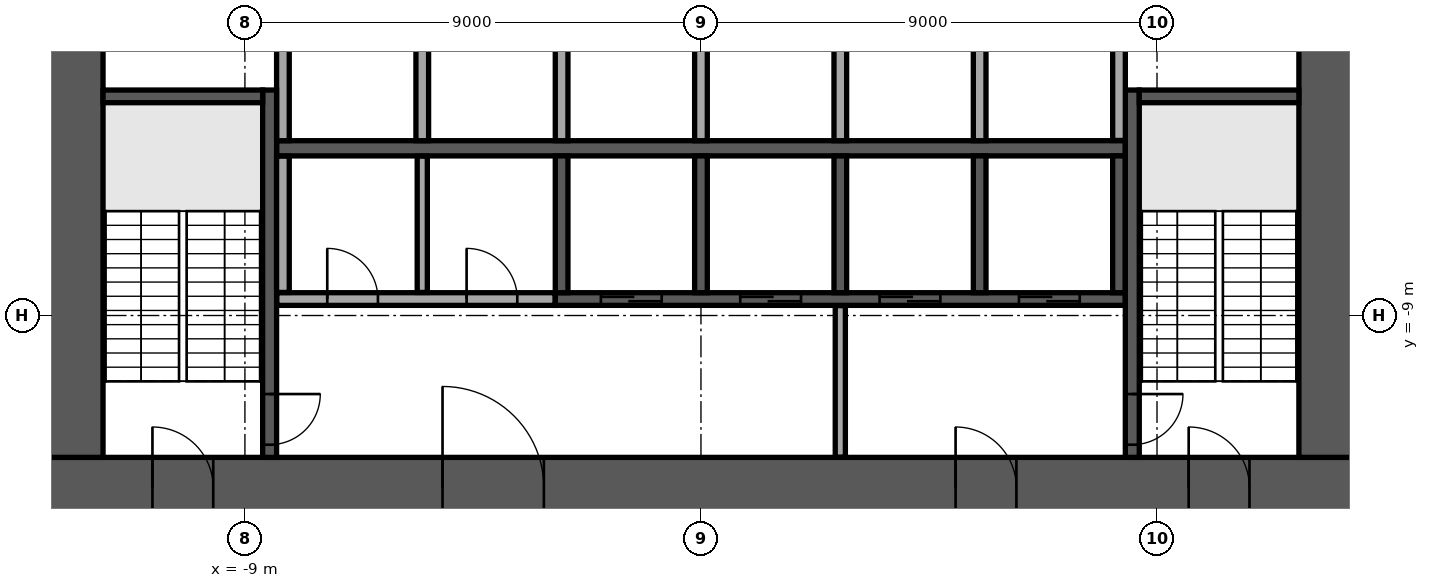
"""IFC4 building model, lengths in metres.
Left out: names, types, materials, properties, quantities, classifications, styles, units other than length and angle.
Written with IfcOpenShell. Run it as: python <this file> out.ifc"""

import sys

from ifc_helpers import new_model, si_unit, direction, frame, frame_2d, origin, place, context, subcontext, project, spatial, rectangle, extrude, element, fill, save


model = new_model("IFC4")
c1 = context("Model", 3, precision=1e-05, world=origin(), true_north=direction((0.0, 1.0)))
c2 = subcontext(c1, "Body", "Model", "MODEL_VIEW")
j1 = project(units=[si_unit("LENGTHUNIT", "METRE"), si_unit("PLANEANGLEUNIT", "RADIAN")], contexts=[c1])
p1 = place(None, origin())
s1 = spatial("IfcSite", under=j1, at=p1, CompositionType="ELEMENT")
p2 = place(p1, origin())
s2 = spatial("IfcBuilding", under=s1, at=p2, CompositionType="ELEMENT")
p3 = place(p2, frame((0.0, 0.0, 36.9)))
s3 = spatial("IfcBuildingStorey", under=s2, at=p3, CompositionType="ELEMENT", Elevation=36.9)
p4 = place(p3, frame((-13.0, -12.4, 0.0), z_axis=(0.0, 0.0, 1.0), x_axis=(1.0, 0.0, 0.0)))
e1 = element("IfcWall", 1, at=p4, inside=s3, PredefinedType="SHEAR", context=c2, shape_type="SweptSolid", body=[
    extrude(rectangle(XDim=26.0, YDim=1.2, at=frame_2d((13.0, 0.0))), origin(), (0.0, 0.0, 1.0), 4.35),
])
p5 = place(p4, frame((7.9, 0.0, 0.0)))
e2 = element("IfcOpeningElement", 2, at=p5, cuts=e1, PredefinedType="OPENING", context=c2, shape_type="SweptSolid", body=[
    extrude(rectangle(XDim=2.0, YDim=2.1, at=frame_2d((1.0, 1.05))), frame((0.0, 0.61, 0.0), z_axis=(0.0, -1.0, 0.0), x_axis=(1.0, 0.0, 0.0)), (0.0, 0.0, 1.0), 1.22),
])
p6 = place(p4, frame((18.025, 0.0, 0.0)))
e3 = element("IfcOpeningElement", 3, at=p6, cuts=e1, PredefinedType="OPENING", context=c2, shape_type="SweptSolid", body=[
    extrude(rectangle(XDim=1.2, YDim=2.1, at=frame_2d((0.6, 1.05))), frame((0.0, 0.61, 0.0), z_axis=(0.0, -1.0, 0.0), x_axis=(1.0, 0.0, 0.0)), (0.0, 0.0, 1.0), 1.22),
])
p7 = place(p4, frame((2.175, 0.0, 0.0)))
e4 = element("IfcOpeningElement", 4, at=p7, cuts=e1, PredefinedType="OPENING", context=c2, shape_type="SweptSolid", body=[
    extrude(rectangle(XDim=1.2, YDim=2.1, at=frame_2d((0.6, 1.05))), frame((0.0, 0.61, 0.0), z_axis=(0.0, -1.0, 0.0), x_axis=(1.0, 0.0, 0.0)), (0.0, 0.0, 1.0), 1.22),
])
p8 = place(p4, frame((22.625, 0.0, 0.0)))
e5 = element("IfcOpeningElement", 5, at=p8, cuts=e1, PredefinedType="OPENING", context=c2, shape_type="SweptSolid", body=[
    extrude(rectangle(XDim=1.2, YDim=2.1, at=frame_2d((0.6, 1.05))), frame((0.0, 0.61, 0.0), z_axis=(0.0, -1.0, 0.0), x_axis=(1.0, 0.0, 0.0)), (0.0, 0.0, 1.0), 1.22),
])
p9 = place(p3, frame((12.4, -11.8, 0.0), z_axis=(0.0, 0.0, 1.0), x_axis=(0.0, 1.0, 0.0)))
e6 = element("IfcWall", 6, at=p9, inside=s3, PredefinedType="SHEAR", context=c2, shape_type="SweptSolid", body=[
    extrude(rectangle(XDim=23.6, YDim=1.2, at=frame_2d((11.8, 0.0))), origin(), (0.0, 0.0, 1.0), 4.35),
])
p10 = place(p9, frame((10.6, 0.0, 0.0)))
e7 = element("IfcOpeningElement", 7, at=p10, cuts=e6, PredefinedType="OPENING", context=c2, shape_type="SweptSolid", body=[
    extrude(rectangle(XDim=2.4, YDim=2.4, at=frame_2d((1.2, 1.2))), frame((0.0, 0.61, 0.0), z_axis=(0.0, -1.0, 0.0), x_axis=(1.0, 0.0, 0.0)), (0.0, 0.0, 1.0), 1.22),
])
p11 = place(p3, frame((-12.4, -11.8, 0.0), z_axis=(0.0, 0.0, 1.0), x_axis=(0.0, 1.0, 0.0)))
e8 = element("IfcWall", 8, at=p11, inside=s3, PredefinedType="SHEAR", context=c2, shape_type="SweptSolid", body=[
    extrude(rectangle(XDim=23.6, YDim=1.2, at=frame_2d((11.8, 0.0))), origin(), (0.0, 0.0, 1.0), 4.35),
])
p12 = place(p11, frame((10.6, 0.0, 0.0)))
e9 = element("IfcOpeningElement", 9, at=p12, cuts=e8, PredefinedType="OPENING", context=c2, shape_type="SweptSolid", body=[
    extrude(rectangle(XDim=2.4, YDim=2.4, at=frame_2d((1.2, 1.2))), frame((0.0, 0.61, 0.0), z_axis=(0.0, -1.0, 0.0), x_axis=(1.0, 0.0, 0.0)), (0.0, 0.0, 1.0), 1.22),
])
p13 = place(p3, frame((-8.375, -5.7, 0.0), z_axis=(0.0, 0.0, 1.0), x_axis=(1.0, 0.0, 0.0)))
e10 = element("IfcWall", 10, at=p13, inside=s3, PredefinedType="SOLIDWALL", context=c2, shape_type="SweptSolid", body=[
    extrude(rectangle(XDim=16.75, YDim=0.3, at=frame_2d((8.375, 0.0))), origin(), (0.0, 0.0, 1.0), 4.35),
])
for number, where, z_axis, x_axis in (
    (11, (-8.25, -5.55, 0.0), (0.0, 0.0, 1.0), (0.0, 1.0, 0.0)),
    (12, (-5.5, -5.55, 0.0), (0.0, 0.0, 1.0), (0.0, 1.0, 0.0)),
    (13, (-2.75, -5.55, 0.0), (0.0, 0.0, 1.0), (0.0, 1.0, 0.0)),
    (14, (0.0, -5.55, 0.0), (0.0, 0.0, 1.0), (0.0, 1.0, 0.0)),
    (15, (2.75, -5.55, 0.0), (0.0, 0.0, 1.0), (0.0, 1.0, 0.0)),
    (16, (5.5, -5.55, 0.0), (0.0, 0.0, 1.0), (0.0, 1.0, 0.0)),
):
    element("IfcWall", number, at=place(p3, frame(where, z_axis=z_axis, x_axis=x_axis)), inside=s3, PredefinedType="SOLIDWALL", context=c2, shape_type="SweptSolid", body=[
        extrude(rectangle(XDim=2.7, YDim=0.25, at=frame_2d((1.35, 0.0))), origin(), (0.0, 0.0, 1.0), 4.35),
    ])
p14 = place(p3, frame((-2.875, -8.675, 0.0), z_axis=(0.0, 0.0, 1.0), x_axis=(1.0, 0.0, 0.0)))
e17 = element("IfcWall", 17, at=p14, inside=s3, PredefinedType="SOLIDWALL", context=c2, shape_type="SweptSolid", body=[
    extrude(rectangle(XDim=11.25, YDim=0.25, at=frame_2d((5.625, 0.0))), origin(), (0.0, 0.0, 1.0), 4.35),
])
p15 = place(p14, frame((0.9, 0.0, 0.0)))
e18 = element("IfcOpeningElement", 18, at=p15, cuts=e17, PredefinedType="OPENING", context=c2, shape_type="SweptSolid", body=[
    extrude(rectangle(XDim=1.2, YDim=2.1, at=frame_2d((0.6, 1.05))), frame((0.0, 0.135, 0.0), z_axis=(0.0, -1.0, 0.0), x_axis=(1.0, 0.0, 0.0)), (0.0, 0.0, 1.0), 0.27),
])
p16 = place(p14, frame((3.65, 0.0, 0.0)))
e19 = element("IfcOpeningElement", 19, at=p16, cuts=e17, PredefinedType="OPENING", context=c2, shape_type="SweptSolid", body=[
    extrude(rectangle(XDim=1.2, YDim=2.1, at=frame_2d((0.6, 1.05))), frame((0.0, 0.135, 0.0), z_axis=(0.0, -1.0, 0.0), x_axis=(1.0, 0.0, 0.0)), (0.0, 0.0, 1.0), 0.27),
])
p17 = place(p14, frame((6.4, 0.0, 0.0)))
e20 = element("IfcOpeningElement", 20, at=p17, cuts=e17, PredefinedType="OPENING", context=c2, shape_type="SweptSolid", body=[
    extrude(rectangle(XDim=1.2, YDim=2.1, at=frame_2d((0.6, 1.05))), frame((0.0, 0.135, 0.0), z_axis=(0.0, -1.0, 0.0), x_axis=(1.0, 0.0, 0.0)), (0.0, 0.0, 1.0), 0.27),
])
p18 = place(p14, frame((9.15, 0.0, 0.0)))
e21 = element("IfcOpeningElement", 21, at=p18, cuts=e17, PredefinedType="OPENING", context=c2, shape_type="SweptSolid", body=[
    extrude(rectangle(XDim=1.2, YDim=2.1, at=frame_2d((0.6, 1.05))), frame((0.0, 0.135, 0.0), z_axis=(0.0, -1.0, 0.0), x_axis=(1.0, 0.0, 0.0)), (0.0, 0.0, 1.0), 0.27),
])
for number, where, z_axis, x_axis in (
    (22, (-2.75, -8.55, 0.0), (0.0, 0.0, 1.0), (0.0, 1.0, 0.0)),
    (23, (0.0, -8.55, 0.0), (0.0, 0.0, 1.0), (0.0, 1.0, 0.0)),
    (24, (2.75, -8.55, 0.0), (0.0, 0.0, 1.0), (0.0, 1.0, 0.0)),
    (25, (5.5, -8.55, 0.0), (0.0, 0.0, 1.0), (0.0, 1.0, 0.0)),
    (26, (8.25, -8.55, 0.0), (0.0, 0.0, 1.0), (0.0, 1.0, 0.0)),
):
    element("IfcWall", number, at=place(p3, frame(where, z_axis=z_axis, x_axis=x_axis)), inside=s3, PredefinedType="SOLIDWALL", context=c2, shape_type="SweptSolid", body=[
        extrude(rectangle(XDim=2.7, YDim=0.25, at=frame_2d((1.35, 0.0))), origin(), (0.0, 0.0, 1.0), 4.35),
    ])
p19 = place(p3, frame((-8.512, -4.55, 0.0), z_axis=(0.0, 0.0, 1.0), x_axis=(0.0, -1.0, 0.0)))
e27 = element("IfcWall", 27, at=p19, inside=s3, PredefinedType="SOLIDWALL", context=c2, shape_type="SweptSolid", body=[
    extrude(rectangle(XDim=7.25, YDim=0.275, at=frame_2d((3.625, 0.0))), origin(), (0.0, 0.0, 1.0), 4.35),
])
p20 = place(p19, frame((6.0, 0.0, 0.0)))
e28 = element("IfcOpeningElement", 28, at=p20, cuts=e27, PredefinedType="OPENING", context=c2, shape_type="SweptSolid", body=[
    extrude(rectangle(XDim=1.0, YDim=2.1, at=frame_2d((0.5, 1.05))), frame((0.0, 0.147, 0.0), z_axis=(0.0, -1.0, 0.0), x_axis=(1.0, 0.0, 0.0)), (0.0, 0.0, 1.0), 0.295),
])
p21 = place(p3, frame((-8.65, -4.675, 0.0), z_axis=(0.0, 0.0, 1.0), x_axis=(-1.0, 0.0, 0.0)))
e29 = element("IfcWall", 29, at=p21, inside=s3, PredefinedType="SOLIDWALL", context=c2, shape_type="SweptSolid", body=[
    extrude(rectangle(XDim=3.15, YDim=0.25, at=frame_2d((1.575, 0.0))), origin(), (0.0, 0.0, 1.0), 4.35),
])
p22 = place(p3, frame((8.512, -4.55, 0.0), z_axis=(0.0, 0.0, 1.0), x_axis=(0.0, -1.0, 0.0)))
e30 = element("IfcWall", 30, at=p22, inside=s3, PredefinedType="SOLIDWALL", context=c2, shape_type="SweptSolid", body=[
    extrude(rectangle(XDim=7.25, YDim=0.275, at=frame_2d((3.625, 0.0))), origin(), (0.0, 0.0, 1.0), 4.35),
])
p23 = place(p22, frame((6.0, 0.0, 0.0)))
e31 = element("IfcOpeningElement", 31, at=p23, cuts=e30, PredefinedType="OPENING", context=c2, shape_type="SweptSolid", body=[
    extrude(rectangle(XDim=1.0, YDim=2.1, at=frame_2d((0.5, 1.05))), frame((0.0, 0.147, 0.0), z_axis=(0.0, -1.0, 0.0), x_axis=(1.0, 0.0, 0.0)), (0.0, 0.0, 1.0), 0.295),
])
p24 = place(p3, frame((8.65, -4.675, 0.0), z_axis=(0.0, 0.0, 1.0), x_axis=(1.0, 0.0, 0.0)))
e32 = element("IfcWall", 32, at=p24, inside=s3, PredefinedType="SOLIDWALL", context=c2, shape_type="SweptSolid", body=[
    extrude(rectangle(XDim=3.15, YDim=0.25, at=frame_2d((1.575, 0.0))), origin(), (0.0, 0.0, 1.0), 4.35),
])
p25 = place(p3, frame((2.75, -11.795, 0.0), z_axis=(0.0, 0.0, 1.0), x_axis=(0.0, 1.0, 0.0)))
e33 = element("IfcWall", 33, at=p25, inside=s3, PredefinedType="PARTITIONING", context=c2, shape_type="SweptSolid", body=[
    extrude(rectangle(XDim=2.99, YDim=0.2, at=frame_2d((1.495, 0.0))), origin(), (0.0, 0.0, 1.0), 4.35),
])
p26 = place(p3, frame((-8.37, -8.675, 0.0), z_axis=(0.0, 0.0, 1.0), x_axis=(1.0, 0.0, 0.0)))
e34 = element("IfcWall", 34, at=p26, inside=s3, PredefinedType="PARTITIONING", context=c2, shape_type="SweptSolid", body=[
    extrude(rectangle(XDim=5.49, YDim=0.25, at=frame_2d((2.745, 0.0))), origin(), (0.0, 0.0, 1.0), 4.35),
])
p27 = place(p26, frame((0.995, 0.0, 0.0)))
e35 = element("IfcOpeningElement", 35, at=p27, cuts=e34, PredefinedType="OPENING", context=c2, shape_type="SweptSolid", body=[
    extrude(rectangle(XDim=1.0, YDim=2.1, at=frame_2d((0.5, 1.05))), frame((0.0, 0.135, 0.0), z_axis=(0.0, -1.0, 0.0), x_axis=(1.0, 0.0, 0.0)), (0.0, 0.0, 1.0), 0.27),
])
p28 = place(p26, frame((3.745, 0.0, 0.0)))
e36 = element("IfcOpeningElement", 36, at=p28, cuts=e34, PredefinedType="OPENING", context=c2, shape_type="SweptSolid", body=[
    extrude(rectangle(XDim=1.0, YDim=2.1, at=frame_2d((0.5, 1.05))), frame((0.0, 0.135, 0.0), z_axis=(0.0, -1.0, 0.0), x_axis=(1.0, 0.0, 0.0)), (0.0, 0.0, 1.0), 0.27),
])
p29 = place(p3, frame((-8.25, -8.545, 0.0), z_axis=(0.0, 0.0, 1.0), x_axis=(0.0, 1.0, 0.0)))
e37 = element("IfcWall", 37, at=p29, inside=s3, PredefinedType="PARTITIONING", context=c2, shape_type="SweptSolid", body=[
    extrude(rectangle(XDim=2.69, YDim=0.25, at=frame_2d((1.345, 0.0))), origin(), (0.0, 0.0, 1.0), 4.35),
])
p30 = place(p3, frame((-5.5, -8.545, 0.0), z_axis=(0.0, 0.0, 1.0), x_axis=(0.0, 1.0, 0.0)))
e38 = element("IfcWall", 38, at=p30, inside=s3, PredefinedType="PARTITIONING", context=c2, shape_type="SweptSolid", body=[
    extrude(rectangle(XDim=2.69, YDim=0.2, at=frame_2d((1.345, 0.0))), origin(), (0.0, 0.0, 1.0), 4.35),
])
p31 = place(p3, frame((8.25, -5.545, 0.0), z_axis=(0.0, 0.0, 1.0), x_axis=(0.0, 1.0, 0.0)))
e39 = element("IfcWall", 39, at=p31, inside=s3, PredefinedType="PARTITIONING", context=c2, shape_type="SweptSolid", body=[
    extrude(rectangle(XDim=2.69, YDim=0.25, at=frame_2d((1.345, 0.0))), origin(), (0.0, 0.0, 1.0), 4.35),
])
p32 = place(p5, origin())
e40 = element("IfcDoor", 40, at=p32, inside=s3, OperationType="SINGLE_SWING_LEFT", PredefinedType="DOOR", context=c2, shape_type="SweptSolid", body=[
    extrude(rectangle(XDim=2.0, YDim=2.1, at=frame_2d((1.0, 1.05))), frame((0.0, 0.025, 0.0), z_axis=(0.0, -1.0, 0.0), x_axis=(1.0, 0.0, 0.0)), (0.0, 0.0, 1.0), 0.05),
])
fill(e2, e40)
p33 = place(p6, origin())
e41 = element("IfcDoor", 41, at=p33, inside=s3, OperationType="SINGLE_SWING_LEFT", PredefinedType="DOOR", context=c2, shape_type="SweptSolid", body=[
    extrude(rectangle(XDim=1.2, YDim=2.1, at=frame_2d((0.6, 1.05))), frame((0.0, 0.025, 0.0), z_axis=(0.0, -1.0, 0.0), x_axis=(1.0, 0.0, 0.0)), (0.0, 0.0, 1.0), 0.05),
])
fill(e3, e41)
p34 = place(p7, origin())
e42 = element("IfcDoor", 42, at=p34, inside=s3, OperationType="SINGLE_SWING_LEFT", PredefinedType="DOOR", context=c2, shape_type="SweptSolid", body=[
    extrude(rectangle(XDim=1.2, YDim=2.1, at=frame_2d((0.6, 1.05))), frame((0.0, 0.025, 0.0), z_axis=(0.0, -1.0, 0.0), x_axis=(1.0, 0.0, 0.0)), (0.0, 0.0, 1.0), 0.05),
])
fill(e4, e42)
p35 = place(p8, origin())
e43 = element("IfcDoor", 43, at=p35, inside=s3, OperationType="SINGLE_SWING_LEFT", PredefinedType="DOOR", context=c2, shape_type="SweptSolid", body=[
    extrude(rectangle(XDim=1.2, YDim=2.1, at=frame_2d((0.6, 1.05))), frame((0.0, 0.025, 0.0), z_axis=(0.0, -1.0, 0.0), x_axis=(1.0, 0.0, 0.0)), (0.0, 0.0, 1.0), 0.05),
])
fill(e5, e43)
p36 = place(p15, origin())
e44 = element("IfcDoor", 44, at=p36, inside=s3, OperationType="DOUBLE_DOOR_SLIDING", PredefinedType="DOOR", context=c2, shape_type="SweptSolid", body=[
    extrude(rectangle(XDim=1.2, YDim=2.1, at=frame_2d((0.6, 1.05))), frame((0.0, 0.025, 0.0), z_axis=(0.0, -1.0, 0.0), x_axis=(1.0, 0.0, 0.0)), (0.0, 0.0, 1.0), 0.05),
])
fill(e18, e44)
p37 = place(p16, origin())
e45 = element("IfcDoor", 45, at=p37, inside=s3, OperationType="DOUBLE_DOOR_SLIDING", PredefinedType="DOOR", context=c2, shape_type="SweptSolid", body=[
    extrude(rectangle(XDim=1.2, YDim=2.1, at=frame_2d((0.6, 1.05))), frame((0.0, 0.025, 0.0), z_axis=(0.0, -1.0, 0.0), x_axis=(1.0, 0.0, 0.0)), (0.0, 0.0, 1.0), 0.05),
])
fill(e19, e45)
p38 = place(p17, origin())
e46 = element("IfcDoor", 46, at=p38, inside=s3, OperationType="DOUBLE_DOOR_SLIDING", PredefinedType="DOOR", context=c2, shape_type="SweptSolid", body=[
    extrude(rectangle(XDim=1.2, YDim=2.1, at=frame_2d((0.6, 1.05))), frame((0.0, 0.025, 0.0), z_axis=(0.0, -1.0, 0.0), x_axis=(1.0, 0.0, 0.0)), (0.0, 0.0, 1.0), 0.05),
])
fill(e20, e46)
p39 = place(p18, origin())
e47 = element("IfcDoor", 47, at=p39, inside=s3, OperationType="DOUBLE_DOOR_SLIDING", PredefinedType="DOOR", context=c2, shape_type="SweptSolid", body=[
    extrude(rectangle(XDim=1.2, YDim=2.1, at=frame_2d((0.6, 1.05))), frame((0.0, 0.025, 0.0), z_axis=(0.0, -1.0, 0.0), x_axis=(1.0, 0.0, 0.0)), (0.0, 0.0, 1.0), 0.05),
])
fill(e21, e47)
p40 = place(p20, origin())
e48 = element("IfcDoor", 48, at=p40, inside=s3, OperationType="SINGLE_SWING_LEFT", PredefinedType="DOOR", context=c2, shape_type="SweptSolid", body=[
    extrude(rectangle(XDim=1.0, YDim=2.1, at=frame_2d((0.5, 1.05))), frame((0.0, 0.025, 0.0), z_axis=(0.0, -1.0, 0.0), x_axis=(1.0, 0.0, 0.0)), (0.0, 0.0, 1.0), 0.05),
])
fill(e28, e48)
p41 = place(p23, origin())
e49 = element("IfcDoor", 49, at=p41, inside=s3, OperationType="SINGLE_SWING_LEFT", PredefinedType="DOOR", context=c2, shape_type="SweptSolid", body=[
    extrude(rectangle(XDim=1.0, YDim=2.1, at=frame_2d((0.5, 1.05))), frame((0.0, 0.025, 0.0), z_axis=(0.0, -1.0, 0.0), x_axis=(1.0, 0.0, 0.0)), (0.0, 0.0, 1.0), 0.05),
])
fill(e31, e49)
p42 = place(p27, origin())
e50 = element("IfcDoor", 50, at=p42, inside=s3, OperationType="SINGLE_SWING_LEFT", PredefinedType="DOOR", context=c2, shape_type="SweptSolid", body=[
    extrude(rectangle(XDim=1.0, YDim=2.1, at=frame_2d((0.5, 1.05))), frame((0.0, 0.025, 0.0), z_axis=(0.0, -1.0, 0.0), x_axis=(1.0, 0.0, 0.0)), (0.0, 0.0, 1.0), 0.05),
])
fill(e35, e50)
p43 = place(p28, origin())
e51 = element("IfcDoor", 51, at=p43, inside=s3, OperationType="SINGLE_SWING_LEFT", PredefinedType="DOOR", context=c2, shape_type="SweptSolid", body=[
    extrude(rectangle(XDim=1.0, YDim=2.1, at=frame_2d((0.5, 1.05))), frame((0.0, 0.025, 0.0), z_axis=(0.0, -1.0, 0.0), x_axis=(1.0, 0.0, 0.0)), (0.0, 0.0, 1.0), 0.05),
])
fill(e36, e51)
save(model, sys.argv[1])
